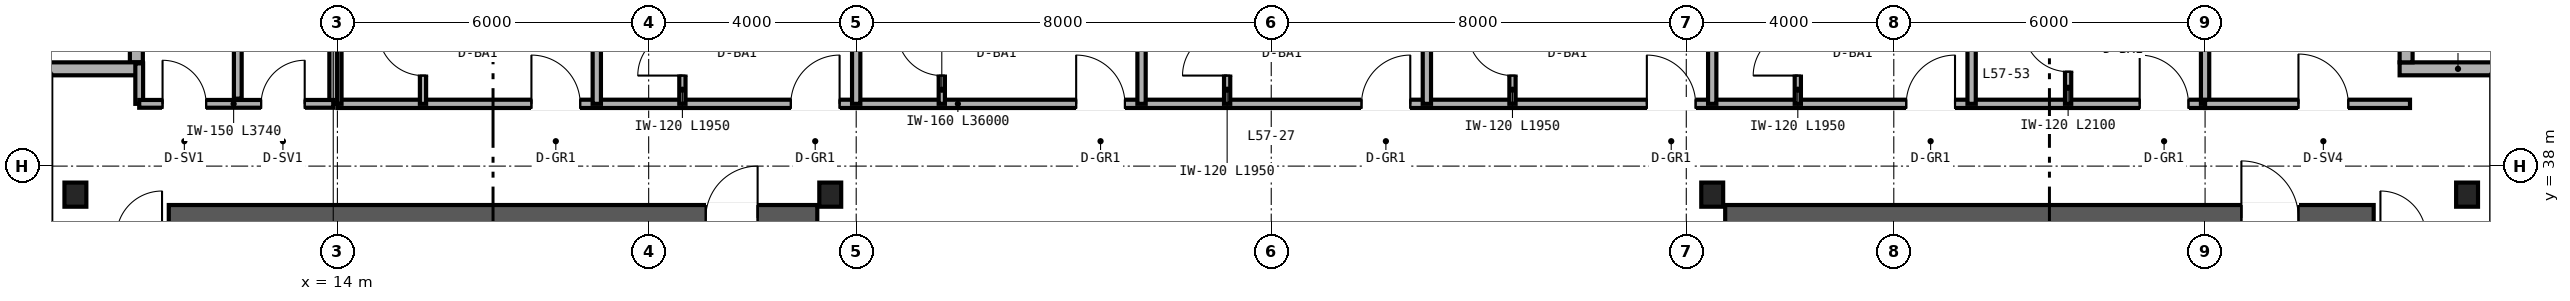
"""IFC4 building model, lengths in metres.
Left out: names, types, materials, properties, quantities, classifications, styles, units other than length and angle.
Written with IfcOpenShell. Run it as: python <this file> out.ifc"""

import sys

from ifc_helpers import new_model, si_unit, direction, frame, frame_2d, origin, origin_2d, place, context, subcontext, project, spatial, rectangle, i_section, extrude, source, transform, mapped, element, fill, save


model = new_model("IFC4")
c1 = context("Model", 3, precision=1e-05, world=origin(), true_north=direction((0.0, 1.0)))
c2 = subcontext(c1, "Body", "Model", "MODEL_VIEW")
j1 = project(units=[si_unit("LENGTHUNIT", "METRE"), si_unit("PLANEANGLEUNIT", "RADIAN")], contexts=[c1])
p1 = place(None, origin())
s1 = spatial("IfcSite", under=j1, at=p1, CompositionType="ELEMENT")
p2 = place(p1, origin())
s2 = spatial("IfcBuilding", under=s1, at=p2, CompositionType="ELEMENT")
p3 = place(p2, frame((0.0, 0.0, 228.0)))
s3 = spatial("IfcBuildingStorey", under=s2, at=p3, CompositionType="ELEMENT", Elevation=228.0)
p4 = place(p3, frame((10.75, 37.0, 0.0), z_axis=(0.0, 0.0, 1.0), x_axis=(1.0, 0.0, 0.0)))
e1 = element("IfcWall", 1, at=p4, inside=s3, PredefinedType="SHEAR", context=c2, shape_type="SweptSolid", body=[
    extrude(rectangle(XDim=12.5, YDim=0.5, at=frame_2d((6.25, 0.0))), origin(), (0.0, 0.0, 1.0), 4.58),
])
p5 = place(p4, frame((10.35, 0.0, 0.0)))
e2 = element("IfcOpeningElement", 2, at=p5, cuts=e1, PredefinedType="OPENING", context=c2, shape_type="SweptSolid", body=[
    extrude(rectangle(XDim=1.0, YDim=2.15, at=frame_2d((0.5, 1.075))), frame((0.0, 0.26, 0.0), z_axis=(0.0, -1.0, 0.0), x_axis=(1.0, 0.0, 0.0)), (0.0, 0.0, 1.0), 0.52),
])
p6 = place(p3, frame((40.75, 37.0, 0.0), z_axis=(0.0, 0.0, 1.0), x_axis=(1.0, 0.0, 0.0)))
e3 = element("IfcWall", 3, at=p6, inside=s3, PredefinedType="SHEAR", context=c2, shape_type="SweptSolid", body=[
    extrude(rectangle(XDim=12.5, YDim=0.5, at=frame_2d((6.25, 0.0))), origin(), (0.0, 0.0, 1.0), 4.58),
])
p7 = place(p6, frame((9.95, 0.0, 0.0)))
e4 = element("IfcOpeningElement", 4, at=p7, cuts=e3, PredefinedType="OPENING", context=c2, shape_type="SweptSolid", body=[
    extrude(rectangle(XDim=1.1, YDim=2.15, at=frame_2d((0.55, 1.075))), frame((0.0, 0.26, 0.0), z_axis=(0.0, -1.0, 0.0), x_axis=(1.0, 0.0, 0.0)), (0.0, 0.0, 1.0), 0.52),
])
m1 = source(origin(), c2, "Body", "SweptSolid", [
    extrude(i_section(OverallWidth=0.422, OverallDepth=0.465, WebThickness=0.045, FlangeThickness=0.073, FilletRadius=0.025, at=origin_2d()), origin(), (0.0, 0.0, 1.0), 4.58),
])
for number, where, z_axis, x_axis in (
    (5, (8.95, 37.45, 0.0), (0.0, 0.0, 1.0), (1.0, 0.0, 0.0)),
    (6, (23.5, 37.45, 0.0), (0.0, 0.0, 1.0), (1.0, 0.0, 0.0)),
    (7, (40.5, 37.45, 0.0), (0.0, 0.0, 1.0), (1.0, 0.0, 0.0)),
    (8, (55.05, 37.45, 0.0), (0.0, 0.0, 1.0), (1.0, 0.0, 0.0)),
):
    element("IfcColumn", number, at=place(p3, frame(where, z_axis=z_axis, x_axis=x_axis)), inside=s3, PredefinedType="COLUMN", context=c2, shape_type="MappedRepresentation", body=[
        mapped(m1, transform((0.0, 0.0, 0.0), scale=1.0)),
    ])
p8 = place(p3, frame((56.0, 39.875, 0.0), z_axis=(0.0, 0.0, 1.0), x_axis=(-1.0, 0.0, 0.0)))
e9 = element("IfcWall", 9, at=p8, inside=s3, PredefinedType="SOLIDWALL", context=c2, shape_type="SweptSolid", body=[
    extrude(rectangle(XDim=2.25, YDim=0.25, at=frame_2d((1.125, 0.0))), origin(), (0.0, 0.0, 1.0), 4.58),
])
for number, where, z_axis, x_axis in (
    (10, (53.875, 40.0, 0.0), (0.0, 0.0, 1.0), (0.0, 1.0, 0.0)),
    (11, (10.125, 42.0, 0.0), (0.0, 0.0, 1.0), (0.0, -1.0, 0.0)),
):
    element("IfcWall", number, at=place(p3, frame(where, z_axis=z_axis, x_axis=x_axis)), inside=s3, PredefinedType="SOLIDWALL", context=c2, shape_type="SweptSolid", body=[
        extrude(rectangle(XDim=2.0, YDim=0.25, at=frame_2d((1.0, 0.0))), origin(), (0.0, 0.0, 1.0), 4.58),
    ])
p9 = place(p3, frame((10.25, 39.875, 0.0), z_axis=(0.0, 0.0, 1.0), x_axis=(-1.0, 0.0, 0.0)))
e12 = element("IfcWall", 12, at=p9, inside=s3, PredefinedType="SOLIDWALL", context=c2, shape_type="SweptSolid", body=[
    extrude(rectangle(XDim=2.25, YDim=0.25, at=frame_2d((1.125, 0.0))), origin(), (0.0, 0.0, 1.0), 4.58),
])
p10 = place(p3, frame((14.0, 39.2, 0.0), z_axis=(0.0, 0.0, 1.0), x_axis=(1.0, 0.0, 0.0)))
e13 = element("IfcWall", 13, at=p10, inside=s3, PredefinedType="PARTITIONING", context=c2, shape_type="SweptSolid", body=[
    extrude(rectangle(XDim=36.0, YDim=0.16, at=frame_2d((18.0, 0.0))), origin(), (0.0, 0.0, 1.0), 4.123),
])
p11 = place(p10, frame((3.74, 0.0, 0.0)))
e14 = element("IfcOpeningElement", 14, at=p11, cuts=e13, PredefinedType="OPENING", context=c2, shape_type="SweptSolid", body=[
    extrude(rectangle(XDim=0.94, YDim=2.15, at=frame_2d((0.47, 1.075))), frame((0.0, 0.09, 0.0), z_axis=(0.0, -1.0, 0.0), x_axis=(1.0, 0.0, 0.0)), (0.0, 0.0, 1.0), 0.18),
])
p12 = place(p10, frame((8.74, 0.0, 0.0)))
e15 = element("IfcOpeningElement", 15, at=p12, cuts=e13, PredefinedType="OPENING", context=c2, shape_type="SweptSolid", body=[
    extrude(rectangle(XDim=0.94, YDim=2.15, at=frame_2d((0.47, 1.075))), frame((0.0, 0.09, 0.0), z_axis=(0.0, -1.0, 0.0), x_axis=(1.0, 0.0, 0.0)), (0.0, 0.0, 1.0), 0.18),
])
p13 = place(p10, frame((14.24, 0.0, 0.0)))
e16 = element("IfcOpeningElement", 16, at=p13, cuts=e13, PredefinedType="OPENING", context=c2, shape_type="SweptSolid", body=[
    extrude(rectangle(XDim=0.94, YDim=2.15, at=frame_2d((0.47, 1.075))), frame((0.0, 0.09, 0.0), z_axis=(0.0, -1.0, 0.0), x_axis=(1.0, 0.0, 0.0)), (0.0, 0.0, 1.0), 0.18),
])
p14 = place(p10, frame((19.74, 0.0, 0.0)))
e17 = element("IfcOpeningElement", 17, at=p14, cuts=e13, PredefinedType="OPENING", context=c2, shape_type="SweptSolid", body=[
    extrude(rectangle(XDim=0.94, YDim=2.15, at=frame_2d((0.47, 1.075))), frame((0.0, 0.09, 0.0), z_axis=(0.0, -1.0, 0.0), x_axis=(1.0, 0.0, 0.0)), (0.0, 0.0, 1.0), 0.18),
])
p15 = place(p10, frame((25.24, 0.0, 0.0)))
e18 = element("IfcOpeningElement", 18, at=p15, cuts=e13, PredefinedType="OPENING", context=c2, shape_type="SweptSolid", body=[
    extrude(rectangle(XDim=0.94, YDim=2.15, at=frame_2d((0.47, 1.075))), frame((0.0, 0.09, 0.0), z_axis=(0.0, -1.0, 0.0), x_axis=(1.0, 0.0, 0.0)), (0.0, 0.0, 1.0), 0.18),
])
p16 = place(p10, frame((30.24, 0.0, 0.0)))
e19 = element("IfcOpeningElement", 19, at=p16, cuts=e13, PredefinedType="OPENING", context=c2, shape_type="SweptSolid", body=[
    extrude(rectangle(XDim=0.94, YDim=2.15, at=frame_2d((0.47, 1.075))), frame((0.0, 0.09, 0.0), z_axis=(0.0, -1.0, 0.0), x_axis=(1.0, 0.0, 0.0)), (0.0, 0.0, 1.0), 0.18),
])
p17 = place(p10, frame((34.74, 0.0, 0.0)))
e20 = element("IfcOpeningElement", 20, at=p17, cuts=e13, PredefinedType="OPENING", context=c2, shape_type="SweptSolid", body=[
    extrude(rectangle(XDim=0.94, YDim=2.15, at=frame_2d((0.47, 1.075))), frame((0.0, 0.09, 0.0), z_axis=(0.0, -1.0, 0.0), x_axis=(1.0, 0.0, 0.0)), (0.0, 0.0, 1.0), 0.18),
])
for number, where, z_axis, x_axis in (
    (21, (14.0, 39.2, 0.0), (0.0, 0.0, 1.0), (0.0, 1.0, 0.0)),
    (22, (50.0, 39.2, 0.0), (0.0, 0.0, 1.0), (0.0, 1.0, 0.0)),
    (23, (19.0, 39.2, 0.0), (0.0, 0.0, 1.0), (0.0, 1.0, 0.0)),
):
    element("IfcWall", number, at=place(p3, frame(where, z_axis=z_axis, x_axis=x_axis)), inside=s3, PredefinedType="PARTITIONING", context=c2, shape_type="SweptSolid", body=[
        extrude(rectangle(XDim=6.44, YDim=0.16, at=frame_2d((3.22, 0.0))), origin(), (0.0, 0.0, 1.0), 3.887),
    ])
p18 = place(p3, frame((15.65, 39.2, 0.0), z_axis=(0.0, 0.0, 1.0), x_axis=(0.0, 1.0, 0.0)))
e24 = element("IfcWall", 24, at=p18, inside=s3, PredefinedType="PARTITIONING", context=c2, shape_type="SweptSolid", body=[
    extrude(rectangle(XDim=1.95, YDim=0.12, at=frame_2d((0.975, 0.0))), origin(), (0.0, 0.0, 1.0), 4.58),
])
p19 = place(p18, frame((0.545, 0.0, 0.0)))
e25 = element("IfcOpeningElement", 25, at=p19, cuts=e24, PredefinedType="OPENING", context=c2, shape_type="SweptSolid", body=[
    extrude(rectangle(XDim=0.86, YDim=2.1, at=frame_2d((0.43, 1.05))), frame((0.0, 0.07, 0.0), z_axis=(0.0, -1.0, 0.0), x_axis=(1.0, 0.0, 0.0)), (0.0, 0.0, 1.0), 0.14),
])
p20 = place(p3, frame((24.0, 39.2, 0.0), z_axis=(0.0, 0.0, 1.0), x_axis=(0.0, 1.0, 0.0)))
e26 = element("IfcWall", 26, at=p20, inside=s3, PredefinedType="PARTITIONING", context=c2, shape_type="SweptSolid", body=[
    extrude(rectangle(XDim=6.44, YDim=0.16, at=frame_2d((3.22, 0.0))), origin(), (0.0, 0.0, 1.0), 3.653),
])
p21 = place(p3, frame((20.65, 39.2, 0.0), z_axis=(0.0, 0.0, 1.0), x_axis=(0.0, 1.0, 0.0)))
e27 = element("IfcWall", 27, at=p21, inside=s3, PredefinedType="PARTITIONING", context=c2, shape_type="SweptSolid", body=[
    extrude(rectangle(XDim=1.95, YDim=0.12, at=frame_2d((0.975, 0.0))), origin(), (0.0, 0.0, 1.0), 4.58),
])
p22 = place(p21, frame((0.545, 0.0, 0.0)))
e28 = element("IfcOpeningElement", 28, at=p22, cuts=e27, PredefinedType="OPENING", context=c2, shape_type="SweptSolid", body=[
    extrude(rectangle(XDim=0.86, YDim=2.1, at=frame_2d((0.43, 1.05))), frame((0.0, 0.07, 0.0), z_axis=(0.0, -1.0, 0.0), x_axis=(1.0, 0.0, 0.0)), (0.0, 0.0, 1.0), 0.14),
])
p23 = place(p3, frame((29.5, 39.2, 0.0), z_axis=(0.0, 0.0, 1.0), x_axis=(0.0, 1.0, 0.0)))
e29 = element("IfcWall", 29, at=p23, inside=s3, PredefinedType="PARTITIONING", context=c2, shape_type="SweptSolid", body=[
    extrude(rectangle(XDim=6.44, YDim=0.16, at=frame_2d((3.22, 0.0))), origin(), (0.0, 0.0, 1.0), 3.653),
])
p24 = place(p3, frame((25.65, 39.2, 0.0), z_axis=(0.0, 0.0, 1.0), x_axis=(0.0, 1.0, 0.0)))
e30 = element("IfcWall", 30, at=p24, inside=s3, PredefinedType="PARTITIONING", context=c2, shape_type="SweptSolid", body=[
    extrude(rectangle(XDim=1.95, YDim=0.12, at=frame_2d((0.975, 0.0))), origin(), (0.0, 0.0, 1.0), 4.58),
])
p25 = place(p24, frame((0.545, 0.0, 0.0)))
e31 = element("IfcOpeningElement", 31, at=p25, cuts=e30, PredefinedType="OPENING", context=c2, shape_type="SweptSolid", body=[
    extrude(rectangle(XDim=0.86, YDim=2.1, at=frame_2d((0.43, 1.05))), frame((0.0, 0.07, 0.0), z_axis=(0.0, -1.0, 0.0), x_axis=(1.0, 0.0, 0.0)), (0.0, 0.0, 1.0), 0.14),
])
p26 = place(p3, frame((35.0, 39.2, 0.0), z_axis=(0.0, 0.0, 1.0), x_axis=(0.0, 1.0, 0.0)))
e32 = element("IfcWall", 32, at=p26, inside=s3, PredefinedType="PARTITIONING", context=c2, shape_type="SweptSolid", body=[
    extrude(rectangle(XDim=6.44, YDim=0.16, at=frame_2d((3.22, 0.0))), origin(), (0.0, 0.0, 1.0), 3.653),
])
p27 = place(p3, frame((31.15, 39.2, 0.0), z_axis=(0.0, 0.0, 1.0), x_axis=(0.0, 1.0, 0.0)))
e33 = element("IfcWall", 33, at=p27, inside=s3, PredefinedType="PARTITIONING", context=c2, shape_type="SweptSolid", body=[
    extrude(rectangle(XDim=1.95, YDim=0.12, at=frame_2d((0.975, 0.0))), origin(), (0.0, 0.0, 1.0), 4.58),
])
p28 = place(p27, frame((0.545, 0.0, 0.0)))
e34 = element("IfcOpeningElement", 34, at=p28, cuts=e33, PredefinedType="OPENING", context=c2, shape_type="SweptSolid", body=[
    extrude(rectangle(XDim=0.86, YDim=2.1, at=frame_2d((0.43, 1.05))), frame((0.0, 0.07, 0.0), z_axis=(0.0, -1.0, 0.0), x_axis=(1.0, 0.0, 0.0)), (0.0, 0.0, 1.0), 0.14),
])
p29 = place(p3, frame((40.5, 39.2, 0.0), z_axis=(0.0, 0.0, 1.0), x_axis=(0.0, 1.0, 0.0)))
e35 = element("IfcWall", 35, at=p29, inside=s3, PredefinedType="PARTITIONING", context=c2, shape_type="SweptSolid", body=[
    extrude(rectangle(XDim=6.44, YDim=0.16, at=frame_2d((3.22, 0.0))), origin(), (0.0, 0.0, 1.0), 3.653),
])
p30 = place(p3, frame((36.65, 39.2, 0.0), z_axis=(0.0, 0.0, 1.0), x_axis=(0.0, 1.0, 0.0)))
e36 = element("IfcWall", 36, at=p30, inside=s3, PredefinedType="PARTITIONING", context=c2, shape_type="SweptSolid", body=[
    extrude(rectangle(XDim=1.95, YDim=0.12, at=frame_2d((0.975, 0.0))), origin(), (0.0, 0.0, 1.0), 4.58),
])
p31 = place(p30, frame((0.545, 0.0, 0.0)))
e37 = element("IfcOpeningElement", 37, at=p31, cuts=e36, PredefinedType="OPENING", context=c2, shape_type="SweptSolid", body=[
    extrude(rectangle(XDim=0.86, YDim=2.1, at=frame_2d((0.43, 1.05))), frame((0.0, 0.07, 0.0), z_axis=(0.0, -1.0, 0.0), x_axis=(1.0, 0.0, 0.0)), (0.0, 0.0, 1.0), 0.14),
])
p32 = place(p3, frame((45.5, 39.2, 0.0), z_axis=(0.0, 0.0, 1.0), x_axis=(0.0, 1.0, 0.0)))
e38 = element("IfcWall", 38, at=p32, inside=s3, PredefinedType="PARTITIONING", context=c2, shape_type="SweptSolid", body=[
    extrude(rectangle(XDim=6.44, YDim=0.16, at=frame_2d((3.22, 0.0))), origin(), (0.0, 0.0, 1.0), 3.887),
])
p33 = place(p3, frame((42.15, 39.2, 0.0), z_axis=(0.0, 0.0, 1.0), x_axis=(0.0, 1.0, 0.0)))
e39 = element("IfcWall", 39, at=p33, inside=s3, PredefinedType="PARTITIONING", context=c2, shape_type="SweptSolid", body=[
    extrude(rectangle(XDim=1.95, YDim=0.12, at=frame_2d((0.975, 0.0))), origin(), (0.0, 0.0, 1.0), 4.58),
])
p34 = place(p33, frame((0.545, 0.0, 0.0)))
e40 = element("IfcOpeningElement", 40, at=p34, cuts=e39, PredefinedType="OPENING", context=c2, shape_type="SweptSolid", body=[
    extrude(rectangle(XDim=0.86, YDim=2.1, at=frame_2d((0.43, 1.05))), frame((0.0, 0.07, 0.0), z_axis=(0.0, -1.0, 0.0), x_axis=(1.0, 0.0, 0.0)), (0.0, 0.0, 1.0), 0.14),
])
p35 = place(p3, frame((47.36, 39.2, 0.0), z_axis=(0.0, 0.0, 1.0), x_axis=(0.0, 1.0, 0.0)))
e41 = element("IfcWall", 41, at=p35, inside=s3, PredefinedType="PARTITIONING", context=c2, shape_type="SweptSolid", body=[
    extrude(rectangle(XDim=2.1, YDim=0.12, at=frame_2d((1.05, 0.0))), origin(), (0.0, 0.0, 1.0), 4.58),
])
p36 = place(p35, frame((0.62, 0.0, 0.0)))
e42 = element("IfcOpeningElement", 42, at=p36, cuts=e41, PredefinedType="OPENING", context=c2, shape_type="SweptSolid", body=[
    extrude(rectangle(XDim=0.86, YDim=2.1, at=frame_2d((0.43, 1.05))), frame((0.0, 0.07, 0.0), z_axis=(0.0, -1.0, 0.0), x_axis=(1.0, 0.0, 0.0)), (0.0, 0.0, 1.0), 0.14),
])
p37 = place(p3, frame((50.0, 39.2, 0.0), z_axis=(0.0, 0.0, 1.0), x_axis=(1.0, 0.0, 0.0)))
e43 = element("IfcWall", 43, at=p37, inside=s3, PredefinedType="PARTITIONING", context=c2, shape_type="SweptSolid", body=[
    extrude(rectangle(XDim=3.95, YDim=0.16, at=frame_2d((1.975, 0.0))), origin(), (0.0, 0.0, 1.0), 4.58),
])
p38 = place(p37, frame((1.8, 0.0, 0.0)))
e44 = element("IfcOpeningElement", 44, at=p38, cuts=e43, PredefinedType="OPENING", context=c2, shape_type="SweptSolid", body=[
    extrude(rectangle(XDim=0.96, YDim=2.15, at=frame_2d((0.48, 1.075))), frame((0.0, 0.09, 0.0), z_axis=(0.0, -1.0, 0.0), x_axis=(1.0, 0.0, 0.0)), (0.0, 0.0, 1.0), 0.18),
])
p39 = place(p3, frame((12.08, 39.3, 0.0), z_axis=(0.0, 0.0, 1.0), x_axis=(0.0, 1.0, 0.0)))
e45 = element("IfcWall", 45, at=p39, inside=s3, PredefinedType="PARTITIONING", context=c2, shape_type="SweptSolid", body=[
    extrude(rectangle(XDim=2.55, YDim=0.15, at=frame_2d((1.275, 0.0))), origin(), (0.0, 0.0, 1.0), 4.58),
])
p40 = place(p3, frame((10.18, 39.2, 0.0), z_axis=(0.0, 0.0, 1.0), x_axis=(0.0, 1.0, 0.0)))
e46 = element("IfcWall", 46, at=p40, inside=s3, PredefinedType="PARTITIONING", context=c2, shape_type="SweptSolid", body=[
    extrude(rectangle(XDim=0.78, YDim=0.15, at=frame_2d((0.39, 0.0))), origin(), (0.0, 0.0, 1.0), 4.58),
])
p41 = place(p3, frame((13.92, 39.2, 0.0), z_axis=(0.0, 0.0, 1.0), x_axis=(0.0, 1.0, 0.0)))
e47 = element("IfcWall", 47, at=p41, inside=s3, PredefinedType="PARTITIONING", context=c2, shape_type="SweptSolid", body=[
    extrude(rectangle(XDim=2.65, YDim=0.15, at=frame_2d((1.325, 0.0))), origin(), (0.0, 0.0, 1.0), 4.58),
])
p42 = place(p3, frame((10.18, 39.2, 0.0), z_axis=(0.0, 0.0, 1.0), x_axis=(1.0, 0.0, 0.0)))
e48 = element("IfcWall", 48, at=p42, inside=s3, PredefinedType="PARTITIONING", context=c2, shape_type="SweptSolid", body=[
    extrude(rectangle(XDim=3.74, YDim=0.15, at=frame_2d((1.87, 0.0))), origin(), (0.0, 0.0, 1.0), 4.58),
])
p43 = place(p42, frame((0.45, 0.0, 0.0)))
e49 = element("IfcOpeningElement", 49, at=p43, cuts=e48, PredefinedType="OPENING", context=c2, shape_type="SweptSolid", body=[
    extrude(rectangle(XDim=0.84, YDim=2.1, at=frame_2d((0.42, 1.05))), frame((0.0, 0.085, 0.0), z_axis=(0.0, -1.0, 0.0), x_axis=(1.0, 0.0, 0.0)), (0.0, 0.0, 1.0), 0.17),
])
p44 = place(p42, frame((2.35, 0.0, 0.0)))
e50 = element("IfcOpeningElement", 50, at=p44, cuts=e48, PredefinedType="OPENING", context=c2, shape_type="SweptSolid", body=[
    extrude(rectangle(XDim=0.84, YDim=2.1, at=frame_2d((0.42, 1.05))), frame((0.0, 0.085, 0.0), z_axis=(0.0, -1.0, 0.0), x_axis=(1.0, 0.0, 0.0)), (0.0, 0.0, 1.0), 0.17),
])
m2 = source(origin(), c2, "Body", "SweptSolid", [
    extrude(rectangle(XDim=1.0, YDim=2.15, at=frame_2d((0.5, 1.075))), frame((0.0, 0.025, 0.0), z_axis=(0.0, -1.0, 0.0), x_axis=(1.0, 0.0, 0.0)), (0.0, 0.0, 1.0), 0.05),
])
p45 = place(p5, origin())
e51 = element("IfcDoor", 51, at=p45, inside=s3, OperationType="SINGLE_SWING_RIGHT", PredefinedType="DOOR", context=c2, shape_type="MappedRepresentation", body=[
    mapped(m2, transform((0.0, 0.0, 0.0), scale=1.0)),
])
fill(e2, e51)
m3 = source(origin(), c2, "Body", "SweptSolid", [
    extrude(rectangle(XDim=1.1, YDim=2.15, at=frame_2d((0.55, 1.075))), frame((0.0, 0.025, 0.0), z_axis=(0.0, -1.0, 0.0), x_axis=(1.0, 0.0, 0.0)), (0.0, 0.0, 1.0), 0.05),
])
p46 = place(p7, origin())
e52 = element("IfcDoor", 52, at=p46, inside=s3, OperationType="SINGLE_SWING_LEFT", PredefinedType="DOOR", context=c2, shape_type="MappedRepresentation", body=[
    mapped(m3, transform((0.0, 0.0, 0.0), scale=1.0)),
])
fill(e4, e52)
m4 = source(origin(), c2, "Body", "SweptSolid", [
    extrude(rectangle(XDim=0.86, YDim=2.1, at=frame_2d((0.43, 1.05))), frame((0.0, 0.025, 0.0), z_axis=(0.0, -1.0, 0.0), x_axis=(1.0, 0.0, 0.0)), (0.0, 0.0, 1.0), 0.05),
])
p47 = place(p19, origin())
e53 = element("IfcDoor", 53, at=p47, inside=s3, OperationType="SINGLE_SWING_RIGHT", PredefinedType="DOOR", context=c2, shape_type="MappedRepresentation", body=[
    mapped(m4, transform((0.0, 0.0, 0.0), scale=1.0)),
])
fill(e25, e53)
p48 = place(p22, origin())
e54 = element("IfcDoor", 54, at=p48, inside=s3, OperationType="SINGLE_SWING_LEFT", PredefinedType="DOOR", context=c2, shape_type="MappedRepresentation", body=[
    mapped(m4, transform((0.0, 0.0, 0.0), scale=1.0)),
])
fill(e28, e54)
p49 = place(p25, origin())
e55 = element("IfcDoor", 55, at=p49, inside=s3, OperationType="SINGLE_SWING_RIGHT", PredefinedType="DOOR", context=c2, shape_type="MappedRepresentation", body=[
    mapped(m4, transform((0.0, 0.0, 0.0), scale=1.0)),
])
fill(e31, e55)
p50 = place(p28, origin())
e56 = element("IfcDoor", 56, at=p50, inside=s3, OperationType="SINGLE_SWING_LEFT", PredefinedType="DOOR", context=c2, shape_type="MappedRepresentation", body=[
    mapped(m4, transform((0.0, 0.0, 0.0), scale=1.0)),
])
fill(e34, e56)
p51 = place(p31, origin())
e57 = element("IfcDoor", 57, at=p51, inside=s3, OperationType="SINGLE_SWING_RIGHT", PredefinedType="DOOR", context=c2, shape_type="MappedRepresentation", body=[
    mapped(m4, transform((0.0, 0.0, 0.0), scale=1.0)),
])
fill(e37, e57)
p52 = place(p34, origin())
e58 = element("IfcDoor", 58, at=p52, inside=s3, OperationType="SINGLE_SWING_LEFT", PredefinedType="DOOR", context=c2, shape_type="MappedRepresentation", body=[
    mapped(m4, transform((0.0, 0.0, 0.0), scale=1.0)),
])
fill(e40, e58)
p53 = place(p36, origin())
e59 = element("IfcDoor", 59, at=p53, inside=s3, OperationType="SINGLE_SWING_RIGHT", PredefinedType="DOOR", context=c2, shape_type="MappedRepresentation", body=[
    mapped(m4, transform((0.0, 0.0, 0.0), scale=1.0)),
])
fill(e42, e59)
m5 = source(origin(), c2, "Body", "SweptSolid", [
    extrude(rectangle(XDim=0.94, YDim=2.15, at=frame_2d((0.47, 1.075))), frame((0.0, 0.025, 0.0), z_axis=(0.0, -1.0, 0.0), x_axis=(1.0, 0.0, 0.0)), (0.0, 0.0, 1.0), 0.05),
])
p54 = place(p11, origin())
e60 = element("IfcDoor", 60, at=p54, inside=s3, OperationType="SINGLE_SWING_LEFT", PredefinedType="DOOR", context=c2, shape_type="MappedRepresentation", body=[
    mapped(m5, transform((0.0, 0.0, 0.0), scale=1.0)),
])
fill(e14, e60)
p55 = place(p12, origin())
e61 = element("IfcDoor", 61, at=p55, inside=s3, OperationType="SINGLE_SWING_RIGHT", PredefinedType="DOOR", context=c2, shape_type="MappedRepresentation", body=[
    mapped(m5, transform((0.0, 0.0, 0.0), scale=1.0)),
])
fill(e15, e61)
p56 = place(p13, origin())
e62 = element("IfcDoor", 62, at=p56, inside=s3, OperationType="SINGLE_SWING_LEFT", PredefinedType="DOOR", context=c2, shape_type="MappedRepresentation", body=[
    mapped(m5, transform((0.0, 0.0, 0.0), scale=1.0)),
])
fill(e16, e62)
p57 = place(p14, origin())
e63 = element("IfcDoor", 63, at=p57, inside=s3, OperationType="SINGLE_SWING_RIGHT", PredefinedType="DOOR", context=c2, shape_type="MappedRepresentation", body=[
    mapped(m5, transform((0.0, 0.0, 0.0), scale=1.0)),
])
fill(e17, e63)
p58 = place(p15, origin())
e64 = element("IfcDoor", 64, at=p58, inside=s3, OperationType="SINGLE_SWING_LEFT", PredefinedType="DOOR", context=c2, shape_type="MappedRepresentation", body=[
    mapped(m5, transform((0.0, 0.0, 0.0), scale=1.0)),
])
fill(e18, e64)
p59 = place(p16, origin())
e65 = element("IfcDoor", 65, at=p59, inside=s3, OperationType="SINGLE_SWING_RIGHT", PredefinedType="DOOR", context=c2, shape_type="MappedRepresentation", body=[
    mapped(m5, transform((0.0, 0.0, 0.0), scale=1.0)),
])
fill(e19, e65)
p60 = place(p17, origin())
e66 = element("IfcDoor", 66, at=p60, inside=s3, OperationType="SINGLE_SWING_LEFT", PredefinedType="DOOR", context=c2, shape_type="MappedRepresentation", body=[
    mapped(m5, transform((0.0, 0.0, 0.0), scale=1.0)),
])
fill(e20, e66)
m6 = source(origin(), c2, "Body", "SweptSolid", [
    extrude(rectangle(XDim=0.96, YDim=2.15, at=frame_2d((0.48, 1.075))), frame((0.0, 0.025, 0.0), z_axis=(0.0, -1.0, 0.0), x_axis=(1.0, 0.0, 0.0)), (0.0, 0.0, 1.0), 0.05),
])
p61 = place(p38, origin())
e67 = element("IfcDoor", 67, at=p61, inside=s3, OperationType="SINGLE_SWING_LEFT", PredefinedType="DOOR", context=c2, shape_type="MappedRepresentation", body=[
    mapped(m6, transform((0.0, 0.0, 0.0), scale=1.0)),
])
fill(e44, e67)
m7 = source(origin(), c2, "Body", "SweptSolid", [
    extrude(rectangle(XDim=0.84, YDim=2.1, at=frame_2d((0.42, 1.05))), frame((0.0, 0.025, 0.0), z_axis=(0.0, -1.0, 0.0), x_axis=(1.0, 0.0, 0.0)), (0.0, 0.0, 1.0), 0.05),
])
p62 = place(p43, origin())
e68 = element("IfcDoor", 68, at=p62, inside=s3, OperationType="SINGLE_SWING_LEFT", PredefinedType="DOOR", context=c2, shape_type="MappedRepresentation", body=[
    mapped(m7, transform((0.0, 0.0, 0.0), scale=1.0)),
])
fill(e49, e68)
p63 = place(p44, origin())
e69 = element("IfcDoor", 69, at=p63, inside=s3, OperationType="SINGLE_SWING_RIGHT", PredefinedType="DOOR", context=c2, shape_type="MappedRepresentation", body=[
    mapped(m7, transform((0.0, 0.0, 0.0), scale=1.0)),
])
fill(e50, e69)
save(model, sys.argv[1])
